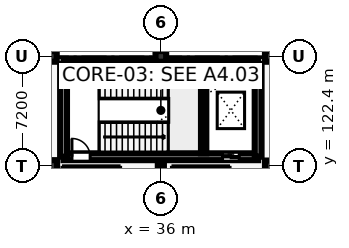
"""IFC4 building model, lengths in metres.
Left out: names, types, materials, properties, quantities, classifications, styles, units other than length and angle.
Written with IfcOpenShell. Run it as: python <this file> out.ifc"""

import sys

from ifc_helpers import new_model, si_unit, direction, frame, frame_2d, origin, origin_2d, place, context, subcontext, project, spatial, rectangle, hollow_rectangle, extrude, element, fill, save


model = new_model("IFC4")
c1 = context("Model", 3, precision=1e-05, world=origin(), true_north=direction((0.0, 1.0)))
c2 = subcontext(c1, "Body", "Model", "MODEL_VIEW")
j1 = project(units=[si_unit("LENGTHUNIT", "METRE"), si_unit("PLANEANGLEUNIT", "RADIAN")], contexts=[c1])
p1 = place(None, origin())
s1 = spatial("IfcSite", under=j1, at=p1, CompositionType="ELEMENT")
p2 = place(p1, origin())
s2 = spatial("IfcBuilding", under=s1, at=p2, CompositionType="ELEMENT")
p3 = place(p2, frame((0.0, 0.0, 9.6)))
s3 = spatial("IfcBuildingStorey", under=s2, at=p3, CompositionType="ELEMENT", Elevation=9.6)
p4 = place(p3, frame((28.8, 122.4, 0.0), z_axis=(0.0, 0.0, 1.0), x_axis=(1.0, 0.0, 0.0)))
e1 = element("IfcColumn", 1, at=p4, inside=s3, PredefinedType="COLUMN", context=c2, shape_type="SweptSolid", body=[
    extrude(rectangle(XDim=0.75, YDim=0.75, at=origin_2d()), origin(), (0.0, 0.0, 1.0), 4.2),
])
p5 = place(p3, frame((28.8, 129.6, 0.0), z_axis=(0.0, 0.0, 1.0), x_axis=(1.0, 0.0, 0.0)))
e2 = element("IfcColumn", 2, at=p5, inside=s3, PredefinedType="COLUMN", context=c2, shape_type="SweptSolid", body=[
    extrude(rectangle(XDim=0.7, YDim=0.7, at=origin_2d()), origin(), (0.0, 0.0, 1.0), 4.2),
])
p6 = place(p3, frame((36.0, 122.4, 0.0), z_axis=(0.0, 0.0, 1.0), x_axis=(1.0, 0.0, 0.0)))
e3 = element("IfcColumn", 3, at=p6, inside=s3, PredefinedType="COLUMN", context=c2, shape_type="SweptSolid", body=[
    extrude(hollow_rectangle(XDim=0.4, YDim=0.4, WallThickness=0.02, at=origin_2d()), origin(), (0.0, 0.0, 1.0), 4.2),
])
for number, where, z_axis, x_axis in (
    (4, (36.0, 129.6, 0.0), (0.0, 0.0, 1.0), (1.0, 0.0, 0.0)),
    (5, (43.2, 122.4, 0.0), (0.0, 0.0, 1.0), (1.0, 0.0, 0.0)),
    (6, (43.2, 129.6, 0.0), (0.0, 0.0, 1.0), (1.0, 0.0, 0.0)),
):
    element("IfcColumn", number, at=place(p3, frame(where, z_axis=z_axis, x_axis=x_axis)), inside=s3, PredefinedType="COLUMN", context=c2, shape_type="SweptSolid", body=[
        extrude(rectangle(XDim=0.7, YDim=0.7, at=origin_2d()), origin(), (0.0, 0.0, 1.0), 4.2),
    ])
p7 = place(p3, frame((29.6, 123.0, 0.0), z_axis=(0.0, 0.0, 1.0), x_axis=(1.0, 0.0, 0.0)))
e7 = element("IfcWall", 7, at=p7, inside=s3, PredefinedType="SHEAR", context=c2, shape_type="SweptSolid", body=[
    extrude(rectangle(XDim=12.8, YDim=0.45, at=frame_2d((6.4, 0.0))), origin(), (0.0, 0.0, 1.0), 3.88),
])
p8 = place(p7, frame((0.55, 0.0, 0.0)))
e8 = element("IfcOpeningElement", 8, at=p8, cuts=e7, PredefinedType="OPENING", context=c2, shape_type="SweptSolid", body=[
    extrude(rectangle(XDim=1.2, YDim=2.25, at=frame_2d((0.6, 1.125))), frame((0.0, 0.235, 0.0), z_axis=(0.0, -1.0, 0.0), x_axis=(1.0, 0.0, 0.0)), (0.0, 0.0, 1.0), 0.47),
])
p9 = place(p7, frame((10.458, 0.0, 0.0)))
e9 = element("IfcOpeningElement", 9, at=p9, cuts=e7, PredefinedType="OPENING", context=c2, shape_type="SweptSolid", body=[
    extrude(rectangle(XDim=1.1, YDim=2.2, at=frame_2d((0.55, 1.1))), frame((0.0, 0.235, 0.0), z_axis=(0.0, -1.0, 0.0), x_axis=(1.0, 0.0, 0.0)), (0.0, 0.0, 1.0), 0.47),
])
p10 = place(p3, frame((29.6, 129.1, 0.0), z_axis=(0.0, 0.0, 1.0), x_axis=(1.0, 0.0, 0.0)))
e10 = element("IfcWall", 10, at=p10, inside=s3, PredefinedType="SHEAR", context=c2, shape_type="SweptSolid", body=[
    extrude(rectangle(XDim=12.8, YDim=0.45, at=frame_2d((6.4, 0.0))), origin(), (0.0, 0.0, 1.0), 3.88),
])
for number, where, z_axis, x_axis in (
    (11, (29.6, 123.0, 0.0), (0.0, 0.0, 1.0), (0.0, 1.0, 0.0)),
    (12, (42.4, 123.0, 0.0), (0.0, 0.0, 1.0), (0.0, 1.0, 0.0)),
):
    element("IfcWall", number, at=place(p3, frame(where, z_axis=z_axis, x_axis=x_axis)), inside=s3, PredefinedType="SHEAR", context=c2, shape_type="SweptSolid", body=[
        extrude(rectangle(XDim=6.1, YDim=0.45, at=frame_2d((3.05, 0.0))), origin(), (0.0, 0.0, 1.0), 3.88),
    ])
p11 = place(p3, frame((38.816, 123.225, 0.0), z_axis=(0.0, 0.0, 1.0), x_axis=(0.0, 1.0, 0.0)))
e13 = element("IfcWall", 13, at=p11, inside=s3, PredefinedType="SHEAR", context=c2, shape_type="SweptSolid", body=[
    extrude(rectangle(XDim=5.65, YDim=0.35, at=frame_2d((2.825, 0.0))), origin(), (0.0, 0.0, 1.0), 3.88),
])
p12 = place(p3, frame((33.15, 122.2, 0.0), z_axis=(0.0, 0.0, 1.0), x_axis=(-1.0, 0.0, 0.0)))
e14 = element("IfcWall", 14, at=p12, inside=s3, PredefinedType="PARTITIONING", context=c2, shape_type="SweptSolid", body=[
    extrude(rectangle(XDim=3.45, YDim=0.2, at=frame_2d((1.725, 0.0))), origin(), (0.0, 0.0, 1.0), 2.94),
])
p13 = place(p3, frame((40.35, 122.2, 0.0), z_axis=(0.0, 0.0, 1.0), x_axis=(-1.0, 0.0, 0.0)))
e15 = element("IfcWall", 15, at=p13, inside=s3, PredefinedType="PARTITIONING", context=c2, shape_type="SweptSolid", body=[
    extrude(rectangle(XDim=3.45, YDim=0.2, at=frame_2d((1.725, 0.0))), origin(), (0.0, 0.0, 1.0), 2.94),
])
p14 = place(p8, origin())
e16 = element("IfcDoor", 16, at=p14, inside=s3, OperationType="SINGLE_SWING_LEFT", PredefinedType="DOOR", context=c2, shape_type="SweptSolid", body=[
    extrude(rectangle(XDim=1.2, YDim=2.25, at=frame_2d((0.6, 1.125))), frame((0.0, 0.025, 0.0), z_axis=(0.0, -1.0, 0.0), x_axis=(1.0, 0.0, 0.0)), (0.0, 0.0, 1.0), 0.05),
])
fill(e8, e16)
p15 = place(p9, origin())
e17 = element("IfcDoor", 17, at=p15, inside=s3, OperationType="SLIDING_TO_RIGHT", PredefinedType="DOOR", context=c2, shape_type="SweptSolid", body=[
    extrude(rectangle(XDim=1.1, YDim=2.2, at=frame_2d((0.55, 1.1))), frame((0.0, 0.025, 0.0), z_axis=(0.0, -1.0, 0.0), x_axis=(1.0, 0.0, 0.0)), (0.0, 0.0, 1.0), 0.05),
])
fill(e9, e17)
save(model, sys.argv[1])
